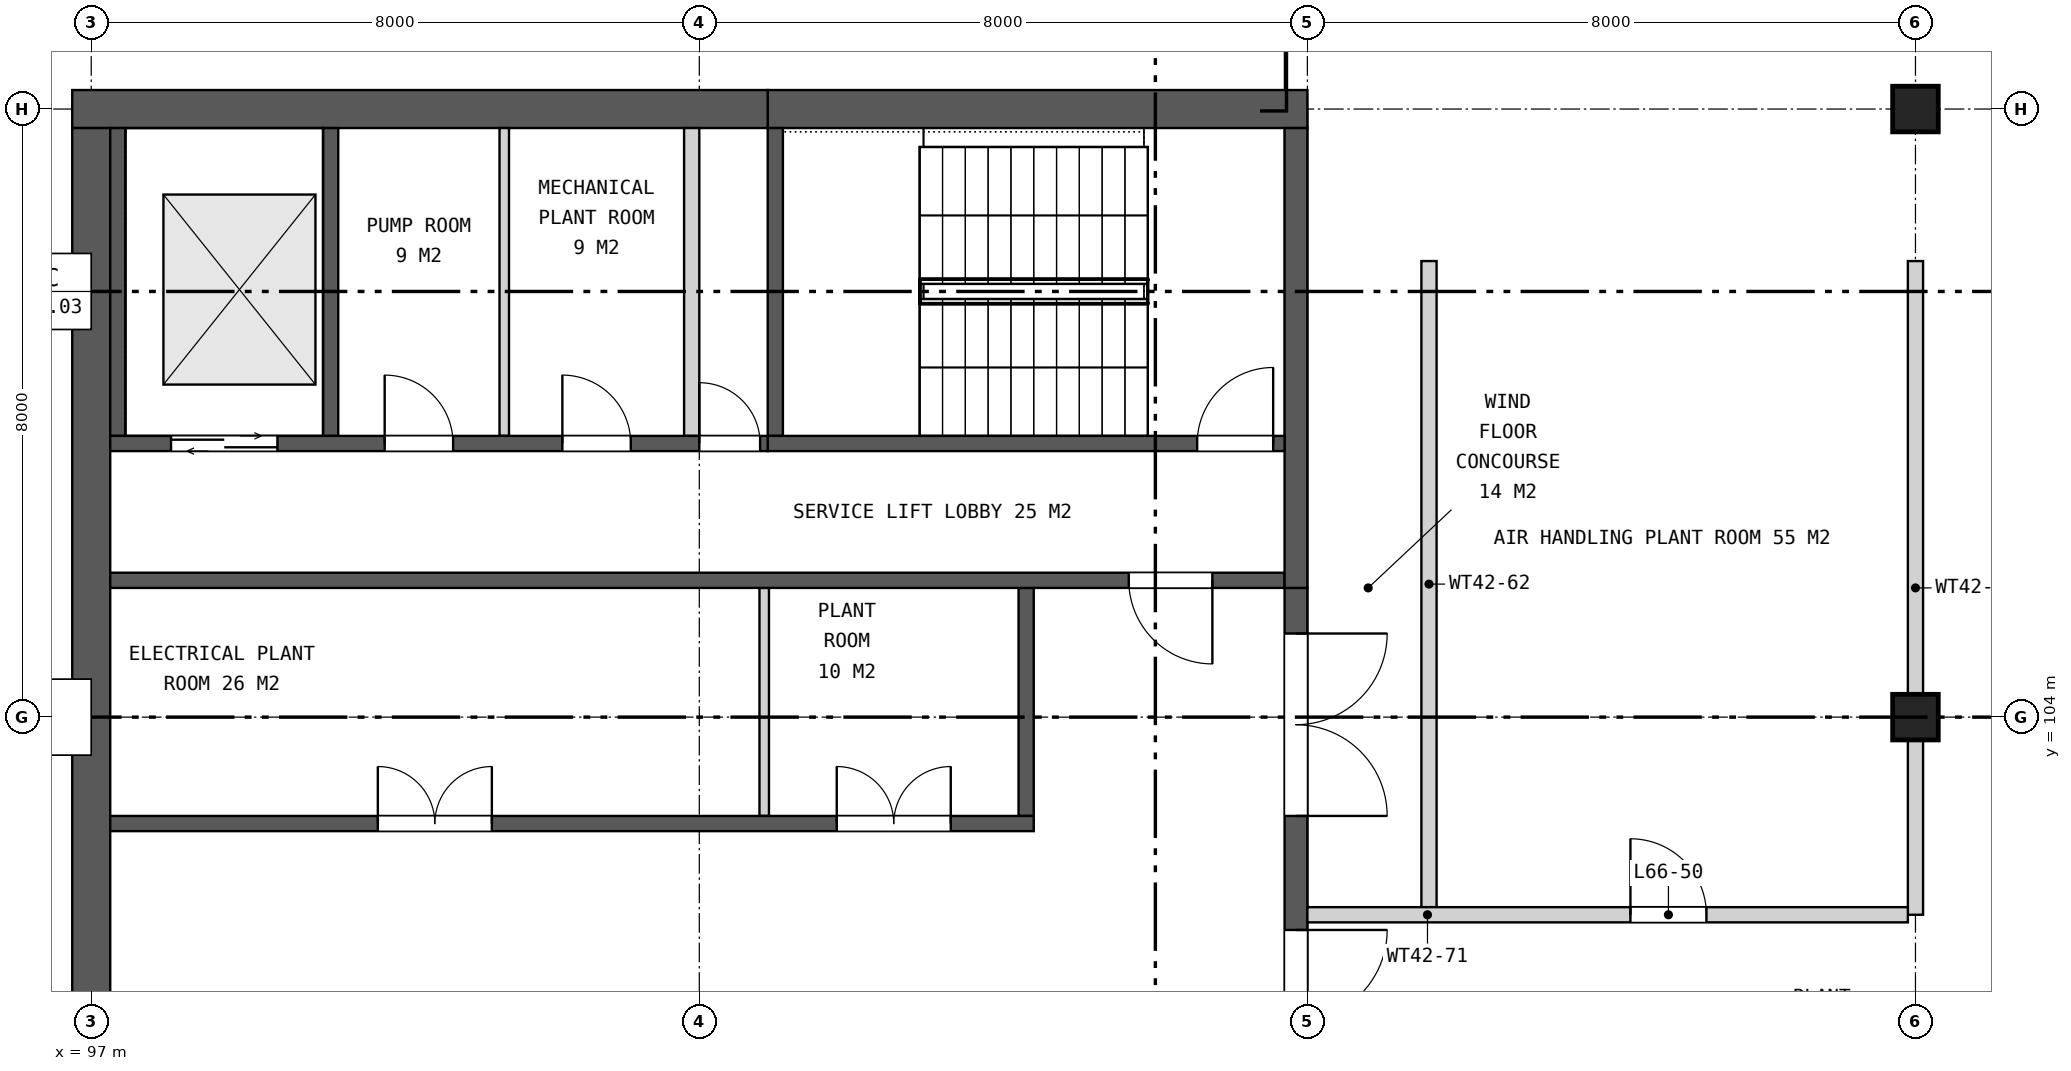
"""IFC4 building model, lengths in metres.
Left out: names, types, materials, properties, quantities, classifications, styles, units other than length and angle.
Written with IfcOpenShell. Run it as: python <this file> out.ifc"""

import sys

from ifc_helpers import new_model, si_unit, direction, frame, frame_2d, origin, origin_2d, place, context, subcontext, project, spatial, rectangle, extrude, element, fill, save


model = new_model("IFC4")
c1 = context("Model", 3, precision=1e-05, world=origin(), true_north=direction((0.0, 1.0)))
c2 = subcontext(c1, "Body", "Model", "MODEL_VIEW")
j1 = project(units=[si_unit("LENGTHUNIT", "METRE"), si_unit("PLANEANGLEUNIT", "RADIAN")], contexts=[c1])
p1 = place(None, origin())
s1 = spatial("IfcSite", under=j1, at=p1, CompositionType="ELEMENT")
p2 = place(p1, origin())
s2 = spatial("IfcBuilding", under=s1, at=p2, CompositionType="ELEMENT")
p3 = place(p2, frame((0.0, 0.0, 303.9)))
s3 = spatial("IfcBuildingStorey", under=s2, at=p3, CompositionType="ELEMENT", Elevation=303.9)
for number, where, z_axis, x_axis in (
    (1, (121.0, 104.0, 0.0), (0.0, 0.0, 1.0), (1.0, 0.0, 0.0)),
    (2, (121.0, 112.0, 0.0), (0.0, 0.0, 1.0), (1.0, 0.0, 0.0)),
):
    element("IfcColumn", number, at=place(p3, frame(where, z_axis=z_axis, x_axis=x_axis)), inside=s3, PredefinedType="COLUMN", context=c2, shape_type="SweptSolid", body=[
        extrude(rectangle(XDim=0.6, YDim=0.6, at=origin_2d()), origin(), (0.0, 0.0, 1.0), 7.4),
    ])
p4 = place(p3, frame((113.0, 112.0, 0.0), z_axis=(0.0, 0.0, 1.0), x_axis=(-1.0, 0.0, 0.0)))
e3 = element("IfcWall", 3, at=p4, inside=s3, PredefinedType="SHEAR", context=c2, shape_type="SweptSolid", body=[
    extrude(rectangle(XDim=7.1, YDim=0.5, at=frame_2d((3.55, 0.0))), origin(), (0.0, 0.0, 1.0), 7.4),
])
p5 = place(p3, frame((105.9, 112.0, 0.0), z_axis=(0.0, 0.0, 1.0), x_axis=(-1.0, 0.0, 0.0)))
e4 = element("IfcWall", 4, at=p5, inside=s3, PredefinedType="SHEAR", context=c2, shape_type="SweptSolid", body=[
    extrude(rectangle(XDim=9.15, YDim=0.5, at=frame_2d((4.575, 0.0))), origin(), (0.0, 0.0, 1.0), 7.4),
])
p6 = place(p3, frame((97.0, 111.75, 0.0), z_axis=(0.0, 0.0, 1.0), x_axis=(0.0, -1.0, 0.0)))
e5 = element("IfcWall", 5, at=p6, inside=s3, PredefinedType="SHEAR", context=c2, shape_type="SweptSolid", body=[
    extrude(rectangle(XDim=23.5, YDim=0.5, at=frame_2d((11.75, 0.0))), origin(), (0.0, 0.0, 1.0), 7.4),
])
p7 = place(p3, frame((112.85, 105.7, 0.0), z_axis=(0.0, 0.0, 1.0), x_axis=(0.0, -1.0, 0.0)))
e6 = element("IfcWall", 6, at=p7, inside=s3, PredefinedType="SHEAR", context=c2, shape_type="SweptSolid", body=[
    extrude(rectangle(XDim=11.4, YDim=0.3, at=frame_2d((5.7, 0.0))), origin(), (0.0, 0.0, 1.0), 7.4),
])
p8 = place(p7, frame((0.6, 0.0, 0.0)))
e7 = element("IfcOpeningElement", 7, at=p8, cuts=e6, PredefinedType="OPENING", context=c2, shape_type="SweptSolid", body=[
    extrude(rectangle(XDim=2.4, YDim=2.4, at=frame_2d((1.2, 1.2))), frame((0.0, 0.16, 0.0), z_axis=(0.0, -1.0, 0.0), x_axis=(1.0, 0.0, 0.0)), (0.0, 0.0, 1.0), 0.32),
])
p9 = place(p7, frame((4.5, 0.0, 0.0)))
e8 = element("IfcOpeningElement", 8, at=p9, cuts=e6, PredefinedType="OPENING", context=c2, shape_type="SweptSolid", body=[
    extrude(rectangle(XDim=2.4, YDim=2.4, at=frame_2d((1.2, 1.2))), frame((0.0, 0.16, 0.0), z_axis=(0.0, -1.0, 0.0), x_axis=(1.0, 0.0, 0.0)), (0.0, 0.0, 1.0), 0.32),
])
p10 = place(p7, frame((8.4, 0.0, 0.0)))
e9 = element("IfcOpeningElement", 9, at=p10, cuts=e6, PredefinedType="OPENING", context=c2, shape_type="SweptSolid", body=[
    extrude(rectangle(XDim=2.4, YDim=2.4, at=frame_2d((1.2, 1.2))), frame((0.0, 0.16, 0.0), z_axis=(0.0, -1.0, 0.0), x_axis=(1.0, 0.0, 0.0)), (0.0, 0.0, 1.0), 0.32),
])
p11 = place(p3, frame((109.3, 105.7, 0.0), z_axis=(0.0, 0.0, 1.0), x_axis=(0.0, -1.0, 0.0)))
e10 = element("IfcWall", 10, at=p11, inside=s3, PredefinedType="SHEAR", context=c2, shape_type="SweptSolid", body=[
    extrude(rectangle(XDim=3.0, YDim=0.2, at=frame_2d((1.5, 0.0))), origin(), (0.0, 0.0, 1.0), 7.4),
])
p12 = place(p3, frame((105.854, 105.7, 0.0), z_axis=(0.0, 0.0, 1.0), x_axis=(0.0, -1.0, 0.0)))
e11 = element("IfcWall", 11, at=p12, inside=s3, PredefinedType="PARTITIONING", context=c2, shape_type="SweptSolid", body=[
    extrude(rectangle(XDim=3.0, YDim=0.125, at=frame_2d((1.5, 0.0))), origin(), (0.0, 0.0, 1.0), 7.4),
])
p13 = place(p3, frame((109.4, 102.6, 0.0), z_axis=(0.0, 0.0, 1.0), x_axis=(-1.0, 0.0, 0.0)))
e12 = element("IfcWall", 12, at=p13, inside=s3, PredefinedType="SHEAR", context=c2, shape_type="SweptSolid", body=[
    extrude(rectangle(XDim=12.15, YDim=0.2, at=frame_2d((6.075, 0.0))), origin(), (0.0, 0.0, 1.0), 7.4),
])
p14 = place(p13, frame((1.092, 0.0, 0.0)))
e13 = element("IfcOpeningElement", 13, at=p14, cuts=e12, PredefinedType="OPENING", context=c2, shape_type="SweptSolid", body=[
    extrude(rectangle(XDim=1.5, YDim=2.1, at=frame_2d((0.75, 1.05))), frame((0.0, 0.11, 0.0), z_axis=(0.0, -1.0, 0.0), x_axis=(1.0, 0.0, 0.0)), (0.0, 0.0, 1.0), 0.22),
])
p15 = place(p13, frame((7.129, 0.0, 0.0)))
e14 = element("IfcOpeningElement", 14, at=p15, cuts=e12, PredefinedType="OPENING", context=c2, shape_type="SweptSolid", body=[
    extrude(rectangle(XDim=1.5, YDim=2.1, at=frame_2d((0.75, 1.05))), frame((0.0, 0.11, 0.0), z_axis=(0.0, -1.0, 0.0), x_axis=(1.0, 0.0, 0.0)), (0.0, 0.0, 1.0), 0.22),
])
p16 = place(p3, frame((112.7, 105.8, 0.0), z_axis=(0.0, 0.0, 1.0), x_axis=(-1.0, 0.0, 0.0)))
e15 = element("IfcWall", 15, at=p16, inside=s3, PredefinedType="SHEAR", context=c2, shape_type="SweptSolid", body=[
    extrude(rectangle(XDim=15.45, YDim=0.2, at=frame_2d((7.725, 0.0))), origin(), (0.0, 0.0, 1.0), 7.4),
])
p17 = place(p16, frame((0.95, 0.0, 0.0)))
e16 = element("IfcOpeningElement", 16, at=p17, cuts=e15, PredefinedType="OPENING", context=c2, shape_type="SweptSolid", body=[
    extrude(rectangle(XDim=1.1, YDim=2.1, at=frame_2d((0.55, 1.05))), frame((0.0, 0.11, 0.0), z_axis=(0.0, -1.0, 0.0), x_axis=(1.0, 0.0, 0.0)), (0.0, 0.0, 1.0), 0.22),
])
p18 = place(p3, frame((112.85, 111.75, 0.0), z_axis=(0.0, 0.0, 1.0), x_axis=(0.0, -1.0, 0.0)))
e17 = element("IfcWall", 17, at=p18, inside=s3, PredefinedType="SHEAR", context=c2, shape_type="SweptSolid", body=[
    extrude(rectangle(XDim=6.05, YDim=0.3, at=frame_2d((3.025, 0.0))), origin(), (0.0, 0.0, 1.0), 7.4),
])
for number, where, z_axis, x_axis in (
    (18, (106.0, 111.75, 0.0), (0.0, 0.0, 1.0), (0.0, -1.0, 0.0)),
    (19, (100.15, 111.75, 0.0), (0.0, 0.0, 1.0), (0.0, -1.0, 0.0)),
    (20, (97.35, 111.75, 0.0), (0.0, 0.0, 1.0), (0.0, -1.0, 0.0)),
):
    element("IfcWall", number, at=place(p3, frame(where, z_axis=z_axis, x_axis=x_axis)), inside=s3, PredefinedType="SHEAR", context=c2, shape_type="SweptSolid", body=[
        extrude(rectangle(XDim=4.05, YDim=0.2, at=frame_2d((2.025, 0.0))), origin(), (0.0, 0.0, 1.0), 7.4),
    ])
p19 = place(p3, frame((104.9, 111.75, 0.0), z_axis=(0.0, 0.0, 1.0), x_axis=(0.0, -1.0, 0.0)))
e21 = element("IfcWall", 21, at=p19, inside=s3, PredefinedType="PARTITIONING", context=c2, shape_type="SweptSolid", body=[
    extrude(rectangle(XDim=4.05, YDim=0.2, at=frame_2d((2.025, 0.0))), origin(), (0.0, 0.0, 1.0), 7.4),
])
p20 = place(p3, frame((102.434, 111.75, 0.0), z_axis=(0.0, 0.0, 1.0), x_axis=(0.0, -1.0, 0.0)))
e22 = element("IfcWall", 22, at=p20, inside=s3, PredefinedType="PARTITIONING", context=c2, shape_type="SweptSolid", body=[
    extrude(rectangle(XDim=4.05, YDim=0.125, at=frame_2d((2.025, 0.0))), origin(), (0.0, 0.0, 1.0), 7.4),
])
p21 = place(p3, frame((112.7, 107.6, 0.0), z_axis=(0.0, 0.0, 1.0), x_axis=(-1.0, 0.0, 0.0)))
e23 = element("IfcWall", 23, at=p21, inside=s3, PredefinedType="SHEAR", context=c2, shape_type="SweptSolid", body=[
    extrude(rectangle(XDim=6.8, YDim=0.2, at=frame_2d((3.4, 0.0))), origin(), (0.0, 0.0, 1.0), 7.4),
])
p22 = place(p21, frame((0.15, 0.0, 0.0)))
e24 = element("IfcOpeningElement", 24, at=p22, cuts=e23, PredefinedType="OPENING", context=c2, shape_type="SweptSolid", body=[
    extrude(rectangle(XDim=1.0, YDim=2.1, at=frame_2d((0.5, 1.05))), frame((0.0, 0.11, 0.0), z_axis=(0.0, -1.0, 0.0), x_axis=(1.0, 0.0, 0.0)), (0.0, 0.0, 1.0), 0.22),
])
p23 = place(p3, frame((105.9, 107.6, 0.0), z_axis=(0.0, 0.0, 1.0), x_axis=(-1.0, 0.0, 0.0)))
e25 = element("IfcWall", 25, at=p23, inside=s3, PredefinedType="SHEAR", context=c2, shape_type="SweptSolid", body=[
    extrude(rectangle(XDim=8.65, YDim=0.2, at=frame_2d((4.325, 0.0))), origin(), (0.0, 0.0, 1.0), 7.4),
])
p24 = place(p23, frame((0.1, 0.0, 0.0)))
e26 = element("IfcOpeningElement", 26, at=p24, cuts=e25, PredefinedType="OPENING", context=c2, shape_type="SweptSolid", body=[
    extrude(rectangle(XDim=0.8, YDim=2.1, at=frame_2d((0.4, 1.05))), frame((0.0, 0.11, 0.0), z_axis=(0.0, -1.0, 0.0), x_axis=(1.0, 0.0, 0.0)), (0.0, 0.0, 1.0), 0.22),
])
p25 = place(p23, frame((1.802, 0.0, 0.0)))
e27 = element("IfcOpeningElement", 27, at=p25, cuts=e25, PredefinedType="OPENING", context=c2, shape_type="SweptSolid", body=[
    extrude(rectangle(XDim=0.9, YDim=2.1, at=frame_2d((0.45, 1.05))), frame((0.0, 0.11, 0.0), z_axis=(0.0, -1.0, 0.0), x_axis=(1.0, 0.0, 0.0)), (0.0, 0.0, 1.0), 0.22),
])
p26 = place(p23, frame((4.139, 0.0, 0.0)))
e28 = element("IfcOpeningElement", 28, at=p26, cuts=e25, PredefinedType="OPENING", context=c2, shape_type="SweptSolid", body=[
    extrude(rectangle(XDim=0.9, YDim=2.1, at=frame_2d((0.45, 1.05))), frame((0.0, 0.11, 0.0), z_axis=(0.0, -1.0, 0.0), x_axis=(1.0, 0.0, 0.0)), (0.0, 0.0, 1.0), 0.22),
])
p27 = place(p23, frame((6.45, 0.0, 0.0)))
e29 = element("IfcOpeningElement", 29, at=p27, cuts=e25, PredefinedType="OPENING", context=c2, shape_type="SweptSolid", body=[
    extrude(rectangle(XDim=1.4, YDim=2.1, at=frame_2d((0.7, 1.05))), frame((0.0, 0.11, 0.0), z_axis=(0.0, -1.0, 0.0), x_axis=(1.0, 0.0, 0.0)), (0.0, 0.0, 1.0), 0.22),
])
p28 = place(p3, frame((114.6, 101.5, 0.0), z_axis=(0.0, 0.0, 1.0), x_axis=(0.0, 1.0, 0.0)))
e30 = element("IfcWall", 30, at=p28, inside=s3, PredefinedType="SOLIDWALL", context=c2, shape_type="SweptSolid", body=[
    extrude(rectangle(XDim=8.5, YDim=0.2, at=frame_2d((4.25, 0.0))), origin(), (0.0, 0.0, 1.0), 6.643),
])
p29 = place(p3, frame((121.0, 101.4, 0.0), z_axis=(0.0, 0.0, 1.0), x_axis=(0.0, 1.0, 0.0)))
e31 = element("IfcWall", 31, at=p29, inside=s3, PredefinedType="SOLIDWALL", context=c2, shape_type="SweptSolid", body=[
    extrude(rectangle(XDim=8.6, YDim=0.2, at=frame_2d((4.3, 0.0))), origin(), (0.0, 0.0, 1.0), 6.643),
])
p30 = place(p3, frame((113.0, 101.4, 0.0), z_axis=(0.0, 0.0, 1.0), x_axis=(1.0, 0.0, 0.0)))
e32 = element("IfcWall", 32, at=p30, inside=s3, PredefinedType="SOLIDWALL", context=c2, shape_type="SweptSolid", body=[
    extrude(rectangle(XDim=7.9, YDim=0.2, at=frame_2d((3.95, 0.0))), origin(), (0.0, 0.0, 1.0), 6.643),
])
p31 = place(p30, frame((4.25, 0.0, 0.0)))
e33 = element("IfcOpeningElement", 33, at=p31, cuts=e32, PredefinedType="OPENING", context=c2, shape_type="SweptSolid", body=[
    extrude(rectangle(XDim=1.0, YDim=2.1, at=frame_2d((0.5, 1.05))), frame((0.0, 0.11, 0.0), z_axis=(0.0, -1.0, 0.0), x_axis=(1.0, 0.0, 0.0)), (0.0, 0.0, 1.0), 0.22),
])
p32 = place(p8, origin())
e34 = element("IfcDoor", 34, at=p32, inside=s3, OperationType="DOUBLE_DOOR_SINGLE_SWING", PredefinedType="DOOR", context=c2, shape_type="SweptSolid", body=[
    extrude(rectangle(XDim=2.4, YDim=2.4, at=frame_2d((1.2, 1.2))), frame((0.0, 0.025, 0.0), z_axis=(0.0, -1.0, 0.0), x_axis=(1.0, 0.0, 0.0)), (0.0, 0.0, 1.0), 0.05),
])
fill(e7, e34)
p33 = place(p9, origin())
e35 = element("IfcDoor", 35, at=p33, inside=s3, OperationType="DOUBLE_DOOR_SINGLE_SWING", PredefinedType="DOOR", context=c2, shape_type="SweptSolid", body=[
    extrude(rectangle(XDim=2.4, YDim=2.4, at=frame_2d((1.2, 1.2))), frame((0.0, 0.025, 0.0), z_axis=(0.0, -1.0, 0.0), x_axis=(1.0, 0.0, 0.0)), (0.0, 0.0, 1.0), 0.05),
])
fill(e8, e35)
p34 = place(p14, frame((1.5, 0.0, 0.0), z_axis=(0.0, 0.0, 1.0), x_axis=(-1.0, 0.0, 0.0)))
e36 = element("IfcDoor", 36, at=p34, inside=s3, OperationType="DOUBLE_DOOR_SINGLE_SWING", PredefinedType="DOOR", context=c2, shape_type="SweptSolid", body=[
    extrude(rectangle(XDim=1.5, YDim=2.1, at=frame_2d((0.75, 1.05))), frame((0.0, 0.025, 0.0), z_axis=(0.0, -1.0, 0.0), x_axis=(1.0, 0.0, 0.0)), (0.0, 0.0, 1.0), 0.05),
])
fill(e13, e36)
p35 = place(p15, frame((1.5, 0.0, 0.0), z_axis=(0.0, 0.0, 1.0), x_axis=(-1.0, 0.0, 0.0)))
e37 = element("IfcDoor", 37, at=p35, inside=s3, OperationType="DOUBLE_DOOR_SINGLE_SWING", PredefinedType="DOOR", context=c2, shape_type="SweptSolid", body=[
    extrude(rectangle(XDim=1.5, YDim=2.1, at=frame_2d((0.75, 1.05))), frame((0.0, 0.025, 0.0), z_axis=(0.0, -1.0, 0.0), x_axis=(1.0, 0.0, 0.0)), (0.0, 0.0, 1.0), 0.05),
])
fill(e14, e37)
p36 = place(p17, origin())
e38 = element("IfcDoor", 38, at=p36, inside=s3, OperationType="SINGLE_SWING_LEFT", PredefinedType="DOOR", context=c2, shape_type="SweptSolid", body=[
    extrude(rectangle(XDim=1.1, YDim=2.1, at=frame_2d((0.55, 1.05))), frame((0.0, 0.025, 0.0), z_axis=(0.0, -1.0, 0.0), x_axis=(1.0, 0.0, 0.0)), (0.0, 0.0, 1.0), 0.05),
])
fill(e16, e38)
p37 = place(p22, frame((1.0, 0.0, 0.0), z_axis=(0.0, 0.0, 1.0), x_axis=(-1.0, 0.0, 0.0)))
e39 = element("IfcDoor", 39, at=p37, inside=s3, OperationType="SINGLE_SWING_RIGHT", PredefinedType="DOOR", context=c2, shape_type="SweptSolid", body=[
    extrude(rectangle(XDim=1.0, YDim=2.1, at=frame_2d((0.5, 1.05))), frame((0.0, 0.025, 0.0), z_axis=(0.0, -1.0, 0.0), x_axis=(1.0, 0.0, 0.0)), (0.0, 0.0, 1.0), 0.05),
])
fill(e24, e39)
p38 = place(p24, frame((0.8, 0.0, 0.0), z_axis=(0.0, 0.0, 1.0), x_axis=(-1.0, 0.0, 0.0)))
e40 = element("IfcDoor", 40, at=p38, inside=s3, OperationType="SINGLE_SWING_LEFT", PredefinedType="DOOR", context=c2, shape_type="SweptSolid", body=[
    extrude(rectangle(XDim=0.8, YDim=2.1, at=frame_2d((0.4, 1.05))), frame((0.0, 0.025, 0.0), z_axis=(0.0, -1.0, 0.0), x_axis=(1.0, 0.0, 0.0)), (0.0, 0.0, 1.0), 0.05),
])
fill(e26, e40)
p39 = place(p25, frame((0.9, 0.0, 0.0), z_axis=(0.0, 0.0, 1.0), x_axis=(-1.0, 0.0, 0.0)))
e41 = element("IfcDoor", 41, at=p39, inside=s3, OperationType="SINGLE_SWING_LEFT", PredefinedType="DOOR", context=c2, shape_type="SweptSolid", body=[
    extrude(rectangle(XDim=0.9, YDim=2.1, at=frame_2d((0.45, 1.05))), frame((0.0, 0.025, 0.0), z_axis=(0.0, -1.0, 0.0), x_axis=(1.0, 0.0, 0.0)), (0.0, 0.0, 1.0), 0.05),
])
fill(e27, e41)
p40 = place(p26, frame((0.9, 0.0, 0.0), z_axis=(0.0, 0.0, 1.0), x_axis=(-1.0, 0.0, 0.0)))
e42 = element("IfcDoor", 42, at=p40, inside=s3, OperationType="SINGLE_SWING_LEFT", PredefinedType="DOOR", context=c2, shape_type="SweptSolid", body=[
    extrude(rectangle(XDim=0.9, YDim=2.1, at=frame_2d((0.45, 1.05))), frame((0.0, 0.025, 0.0), z_axis=(0.0, -1.0, 0.0), x_axis=(1.0, 0.0, 0.0)), (0.0, 0.0, 1.0), 0.05),
])
fill(e28, e42)
p41 = place(p27, origin())
e43 = element("IfcDoor", 43, at=p41, inside=s3, OperationType="DOUBLE_DOOR_SLIDING", PredefinedType="DOOR", context=c2, shape_type="SweptSolid", body=[
    extrude(rectangle(XDim=1.4, YDim=2.1, at=frame_2d((0.7, 1.05))), frame((0.0, 0.025, 0.0), z_axis=(0.0, -1.0, 0.0), x_axis=(1.0, 0.0, 0.0)), (0.0, 0.0, 1.0), 0.05),
])
fill(e29, e43)
p42 = place(p31, origin())
e44 = element("IfcDoor", 44, at=p42, inside=s3, OperationType="SINGLE_SWING_LEFT", PredefinedType="DOOR", context=c2, shape_type="SweptSolid", body=[
    extrude(rectangle(XDim=1.0, YDim=2.1, at=frame_2d((0.5, 1.05))), frame((0.0, 0.025, 0.0), z_axis=(0.0, -1.0, 0.0), x_axis=(1.0, 0.0, 0.0)), (0.0, 0.0, 1.0), 0.05),
])
fill(e33, e44)
save(model, sys.argv[1])
